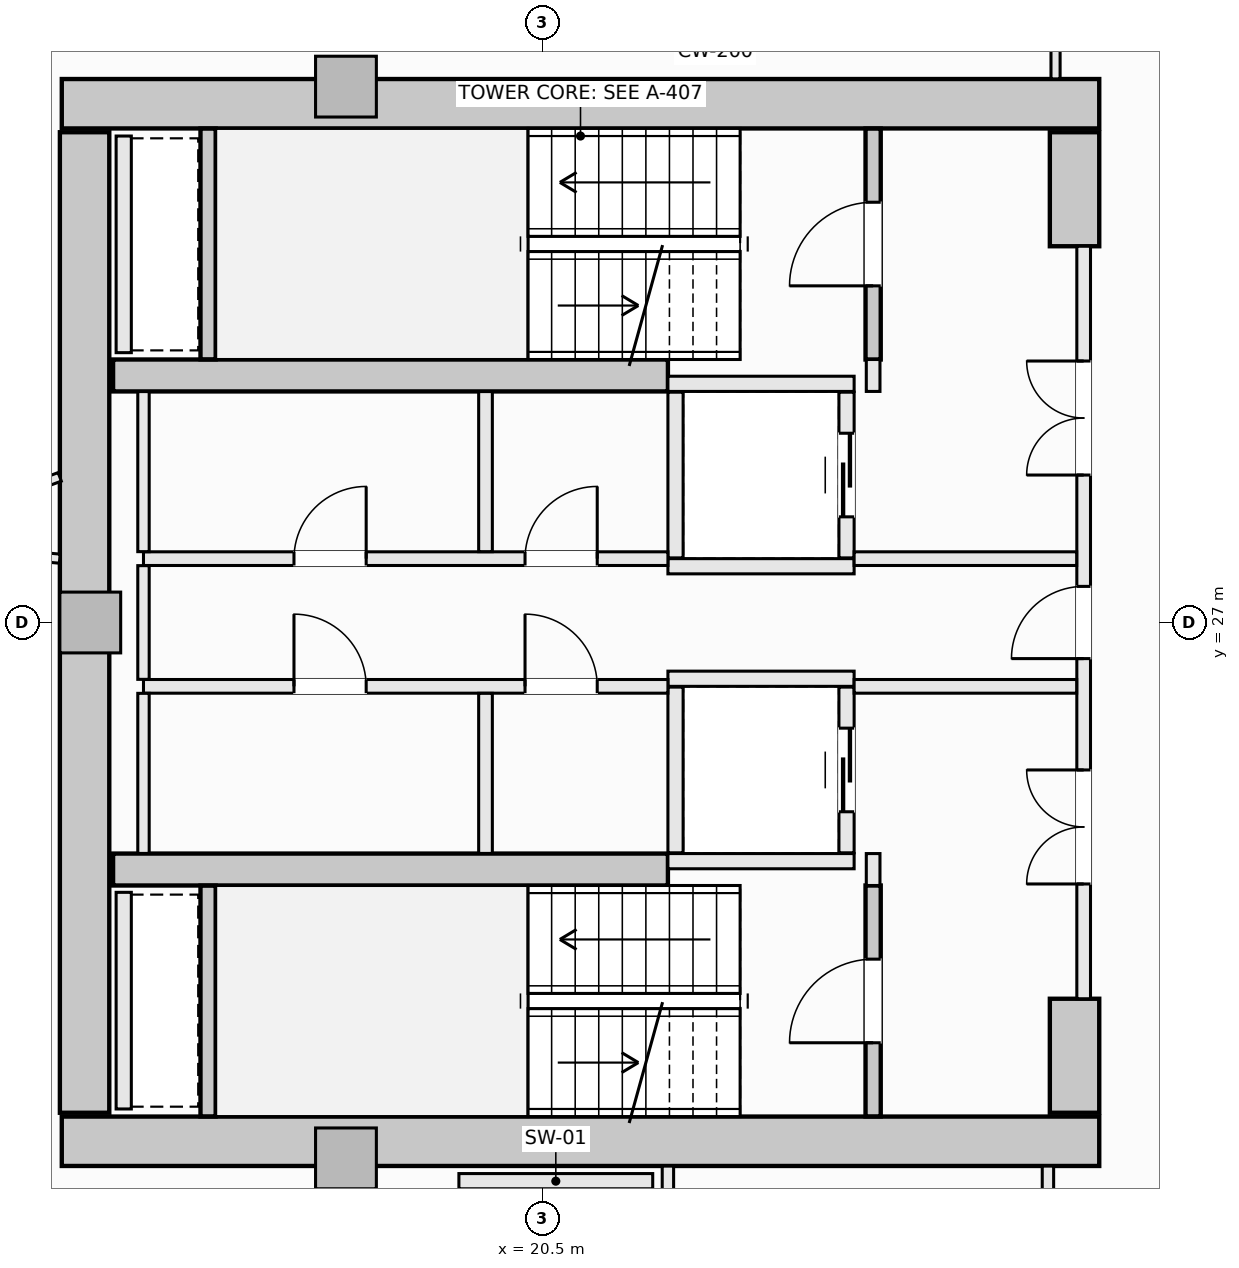
"""IFC4 building model, lengths in metres.
Left out: names, types, materials, properties, quantities, classifications, styles, units other than length and angle.
Written with IfcOpenShell. Run it as: python <this file> out.ifc"""

import sys

from ifc_helpers import new_model, si_unit, direction, frame, frame_2d, origin, origin_2d, place, context, subcontext, project, spatial, rectangle, extrude, element, fill, save


model = new_model("IFC4")
c1 = context("Model", 3, precision=1e-05, world=origin(), true_north=direction((0.0, 1.0)))
c2 = subcontext(c1, "Body", "Model", "MODEL_VIEW")
j1 = project(units=[si_unit("LENGTHUNIT", "METRE"), si_unit("PLANEANGLEUNIT", "RADIAN")], contexts=[c1])
p1 = place(None, origin())
s1 = spatial("IfcSite", under=j1, at=p1, CompositionType="ELEMENT")
p2 = place(p1, origin())
s2 = spatial("IfcBuilding", under=s1, at=p2, CompositionType="ELEMENT")
p3 = place(p2, frame((0.0, 0.0, 132.5)))
s3 = spatial("IfcBuildingStorey", under=s2, at=p3, CompositionType="ELEMENT", Elevation=132.5)
for number, where, z_axis, x_axis in (
    (1, (14.175, 33.825, -0.27), (0.0, 0.0, 1.0), (1.0, 0.0, 0.0)),
    (2, (14.175, 20.175, -0.27), (0.0, 0.0, 1.0), (1.0, 0.0, 0.0)),
):
    element("IfcWall", number, at=place(p3, frame(where, z_axis=z_axis, x_axis=x_axis)), inside=s3, PredefinedType="SHEAR", context=c2, shape_type="SweptSolid", body=[
        extrude(rectangle(XDim=13.65, YDim=0.65, at=frame_2d((6.825, 0.0))), origin(), (0.0, 0.0, 1.0), 3.4),
    ])
p4 = place(p3, frame((14.475, 20.55, -0.27), z_axis=(0.0, 0.0, 1.0), x_axis=(0.0, 1.0, 0.0)))
e3 = element("IfcWall", 3, at=p4, inside=s3, PredefinedType="SHEAR", context=c2, shape_type="SweptSolid", body=[
    extrude(rectangle(XDim=12.9, YDim=0.65, at=frame_2d((6.45, 0.0))), origin(), (0.0, 0.0, 1.0), 3.4),
])
for number, where, z_axis, x_axis in (
    (4, (27.5, 31.95, -0.27), (0.0, 0.0, 1.0), (0.0, 1.0, 0.0)),
    (5, (27.5, 20.55, -0.27), (0.0, 0.0, 1.0), (0.0, 1.0, 0.0)),
):
    element("IfcWall", number, at=place(p3, frame(where, z_axis=z_axis, x_axis=x_axis)), inside=s3, PredefinedType="SHEAR", context=c2, shape_type="SweptSolid", body=[
        extrude(rectangle(XDim=1.5, YDim=0.65, at=frame_2d((0.75, 0.0))), origin(), (0.0, 0.0, 1.0), 3.4),
    ])
for number, where, z_axis, x_axis in (
    (6, (14.85, 30.25, -0.27), (0.0, 0.0, 1.0), (1.0, 0.0, 0.0)),
    (7, (14.85, 23.75, -0.27), (0.0, 0.0, 1.0), (1.0, 0.0, 0.0)),
):
    element("IfcWall", number, at=place(p3, frame(where, z_axis=z_axis, x_axis=x_axis)), inside=s3, PredefinedType="SHEAR", context=c2, shape_type="SweptSolid", body=[
        extrude(rectangle(XDim=7.3, YDim=0.42, at=frame_2d((3.65, 0.0))), origin(), (0.0, 0.0, 1.0), 3.4),
    ])
for number, where, z_axis, x_axis in (
    (8, (17.914, 34.05, -0.27), (0.0, 0.0, 1.0), (1.0, 0.0, 0.0)),
    (9, (14.55, 27.0, -0.27), (0.0, 0.0, 1.0), (1.0, 0.0, 0.0)),
    (10, (17.914, 19.95, -0.27), (0.0, 0.0, 1.0), (1.0, 0.0, 0.0)),
):
    element("IfcColumn", number, at=place(p3, frame(where, z_axis=z_axis, x_axis=x_axis)), inside=s3, PredefinedType="PILASTER", context=c2, shape_type="SweptSolid", body=[
        extrude(rectangle(XDim=0.8, YDim=0.8, at=origin_2d()), origin(), (0.0, 0.0, 1.0), 3.4),
    ])
p5 = place(p3, frame((24.85, 30.46, -0.27), z_axis=(0.0, 0.0, 1.0), x_axis=(0.0, 1.0, 0.0)))
e11 = element("IfcWall", 11, at=p5, inside=s3, PredefinedType="SHEAR", context=c2, shape_type="SweptSolid", body=[
    extrude(rectangle(XDim=3.038, YDim=0.2, at=frame_2d((1.519, 0.0))), origin(), (0.0, 0.0, 1.0), 3.4),
])
p6 = place(p5, frame((0.969, 0.0, 0.27)))
e12 = element("IfcOpeningElement", 12, at=p6, cuts=e11, PredefinedType="OPENING", context=c2, shape_type="SweptSolid", body=[
    extrude(rectangle(XDim=1.1, YDim=2.15, at=frame_2d((0.55, 1.075))), frame((0.0, 0.11, 0.0), z_axis=(0.0, -1.0, 0.0), x_axis=(1.0, 0.0, 0.0)), (0.0, 0.0, 1.0), 0.22),
])
p7 = place(p3, frame((16.1, 30.462, -0.27), z_axis=(0.0, 0.0, 1.0), x_axis=(0.0, 1.0, 0.0)))
e13 = element("IfcWall", 13, at=p7, inside=s3, PredefinedType="SHEAR", context=c2, shape_type="SweptSolid", body=[
    extrude(rectangle(XDim=3.036, YDim=0.2, at=frame_2d((1.518, 0.0))), origin(), (0.0, 0.0, 1.0), 3.4),
])
p8 = place(p3, frame((24.85, 20.502, -0.27), z_axis=(0.0, 0.0, 1.0), x_axis=(0.0, 1.0, 0.0)))
e14 = element("IfcWall", 14, at=p8, inside=s3, PredefinedType="SHEAR", context=c2, shape_type="SweptSolid", body=[
    extrude(rectangle(XDim=3.038, YDim=0.2, at=frame_2d((1.519, 0.0))), origin(), (0.0, 0.0, 1.0), 3.4),
])
p9 = place(p8, frame((0.969, 0.0, 0.27)))
e15 = element("IfcOpeningElement", 15, at=p9, cuts=e14, PredefinedType="OPENING", context=c2, shape_type="SweptSolid", body=[
    extrude(rectangle(XDim=1.1, YDim=2.15, at=frame_2d((0.55, 1.075))), frame((0.0, 0.11, 0.0), z_axis=(0.0, -1.0, 0.0), x_axis=(1.0, 0.0, 0.0)), (0.0, 0.0, 1.0), 0.22),
])
p10 = place(p3, frame((16.1, 20.502, -0.27), z_axis=(0.0, 0.0, 1.0), x_axis=(0.0, 1.0, 0.0)))
e16 = element("IfcWall", 16, at=p10, inside=s3, PredefinedType="SHEAR", context=c2, shape_type="SweptSolid", body=[
    extrude(rectangle(XDim=3.036, YDim=0.2, at=frame_2d((1.518, 0.0))), origin(), (0.0, 0.0, 1.0), 3.4),
])
for number, where, z_axis, x_axis in (
    (17, (22.15, 30.14, 0.0), (0.0, 0.0, 1.0), (1.0, 0.0, 0.0)),
    (18, (22.15, 27.74, 0.0), (0.0, 0.0, 1.0), (1.0, 0.0, 0.0)),
):
    element("IfcWall", number, at=place(p3, frame(where, z_axis=z_axis, x_axis=x_axis)), inside=s3, PredefinedType="SOLIDWALL", context=c2, shape_type="SweptSolid", body=[
        extrude(rectangle(XDim=2.45, YDim=0.2, at=frame_2d((1.225, 0.0))), origin(), (0.0, 0.0, 1.0), 3.13),
    ])
p11 = place(p3, frame((22.25, 27.85, 0.0), z_axis=(0.0, 0.0, 1.0), x_axis=(0.0, 1.0, 0.0)))
e19 = element("IfcWall", 19, at=p11, inside=s3, PredefinedType="SOLIDWALL", context=c2, shape_type="SweptSolid", body=[
    extrude(rectangle(XDim=2.18, YDim=0.2, at=frame_2d((1.09, 0.0))), origin(), (0.0, 0.0, 1.0), 3.13),
])
p12 = place(p3, frame((24.5, 27.85, 0.0), z_axis=(0.0, 0.0, 1.0), x_axis=(0.0, 1.0, 0.0)))
e20 = element("IfcWall", 20, at=p12, inside=s3, PredefinedType="SOLIDWALL", context=c2, shape_type="SweptSolid", body=[
    extrude(rectangle(XDim=2.18, YDim=0.2, at=frame_2d((1.09, 0.0))), origin(), (0.0, 0.0, 1.0), 3.13),
])
p13 = place(p12, frame((0.54, 0.0, 0.0)))
e21 = element("IfcOpeningElement", 21, at=p13, cuts=e20, PredefinedType="OPENING", context=c2, shape_type="SweptSolid", body=[
    extrude(rectangle(XDim=1.1, YDim=2.2, at=frame_2d((0.55, 1.1))), frame((0.0, 0.11, 0.0), z_axis=(0.0, -1.0, 0.0), x_axis=(1.0, 0.0, 0.0)), (0.0, 0.0, 1.0), 0.22),
])
for number, where, z_axis, x_axis in (
    (22, (22.15, 26.26, 0.0), (0.0, 0.0, 1.0), (1.0, 0.0, 0.0)),
    (23, (22.15, 23.86, 0.0), (0.0, 0.0, 1.0), (1.0, 0.0, 0.0)),
):
    element("IfcWall", number, at=place(p3, frame(where, z_axis=z_axis, x_axis=x_axis)), inside=s3, PredefinedType="SOLIDWALL", context=c2, shape_type="SweptSolid", body=[
        extrude(rectangle(XDim=2.45, YDim=0.2, at=frame_2d((1.225, 0.0))), origin(), (0.0, 0.0, 1.0), 3.13),
    ])
p14 = place(p3, frame((22.25, 23.97, 0.0), z_axis=(0.0, 0.0, 1.0), x_axis=(0.0, 1.0, 0.0)))
e24 = element("IfcWall", 24, at=p14, inside=s3, PredefinedType="SOLIDWALL", context=c2, shape_type="SweptSolid", body=[
    extrude(rectangle(XDim=2.18, YDim=0.2, at=frame_2d((1.09, 0.0))), origin(), (0.0, 0.0, 1.0), 3.13),
])
p15 = place(p3, frame((24.5, 23.97, 0.0), z_axis=(0.0, 0.0, 1.0), x_axis=(0.0, 1.0, 0.0)))
e25 = element("IfcWall", 25, at=p15, inside=s3, PredefinedType="SOLIDWALL", context=c2, shape_type="SweptSolid", body=[
    extrude(rectangle(XDim=2.18, YDim=0.2, at=frame_2d((1.09, 0.0))), origin(), (0.0, 0.0, 1.0), 3.13),
])
p16 = place(p15, frame((0.54, 0.0, 0.0)))
e26 = element("IfcOpeningElement", 26, at=p16, cuts=e25, PredefinedType="OPENING", context=c2, shape_type="SweptSolid", body=[
    extrude(rectangle(XDim=1.1, YDim=2.2, at=frame_2d((0.55, 1.1))), frame((0.0, 0.11, 0.0), z_axis=(0.0, -1.0, 0.0), x_axis=(1.0, 0.0, 0.0)), (0.0, 0.0, 1.0), 0.22),
])
p17 = place(p3, frame((19.4, 19.65, 0.0), z_axis=(0.0, 0.0, 1.0), x_axis=(1.0, 0.0, 0.0)))
e27 = element("IfcWall", 27, at=p17, inside=s3, PredefinedType="SOLIDWALL", context=c2, shape_type="SweptSolid", body=[
    extrude(rectangle(XDim=2.55, YDim=0.2, at=frame_2d((1.275, 0.0))), origin(), (0.0, 0.0, 1.0), 3.13),
])
for number, where, z_axis, x_axis in (
    (28, (14.99, 30.55, 0.0), (0.0, 0.0, 1.0), (0.0, 1.0, 0.0)),
    (29, (14.99, 20.6, 0.0), (0.0, 0.0, 1.0), (0.0, 1.0, 0.0)),
):
    element("IfcWall", number, at=place(p3, frame(where, z_axis=z_axis, x_axis=x_axis)), inside=s3, PredefinedType="SOLIDWALL", context=c2, shape_type="SweptSolid", body=[
        extrude(rectangle(XDim=2.85, YDim=0.2, at=frame_2d((1.425, 0.0))), origin(), (0.0, 0.0, 1.0), 3.13),
    ])
for number, where, z_axis, x_axis in (
    (30, (24.85, 23.54, 0.0), (0.0, 0.0, 1.0), (0.0, 1.0, 0.0)),
    (31, (24.85, 30.04, 0.0), (0.0, 0.0, 1.0), (0.0, 1.0, 0.0)),
):
    element("IfcWall", number, at=place(p3, frame(where, z_axis=z_axis, x_axis=x_axis)), inside=s3, PredefinedType="SOLIDWALL", context=c2, shape_type="SweptSolid", body=[
        extrude(rectangle(XDim=0.42, YDim=0.18, at=frame_2d((0.21, 0.0))), origin(), (0.0, 0.0, 1.0), 3.13),
    ])
p18 = place(p3, frame((27.62, 22.05, 0.0), z_axis=(0.0, 0.0, 1.0), x_axis=(0.0, 1.0, 0.0)))
e32 = element("IfcWall", 32, at=p18, inside=s3, PredefinedType="SOLIDWALL", context=c2, shape_type="SweptSolid", body=[
    extrude(rectangle(XDim=9.9, YDim=0.18, at=frame_2d((4.95, 0.0))), origin(), (0.0, 0.0, 1.0), 3.13),
])
p19 = place(p18, frame((4.475, 0.0, 0.0)))
e33 = element("IfcOpeningElement", 33, at=p19, cuts=e32, PredefinedType="OPENING", context=c2, shape_type="SweptSolid", body=[
    extrude(rectangle(XDim=0.95, YDim=2.1, at=frame_2d((0.475, 1.05))), frame((0.0, 0.1, 0.0), z_axis=(0.0, -1.0, 0.0), x_axis=(1.0, 0.0, 0.0)), (0.0, 0.0, 1.0), 0.2),
])
p20 = place(p18, frame((6.89, 0.0, 0.0)))
e34 = element("IfcOpeningElement", 34, at=p20, cuts=e32, PredefinedType="OPENING", context=c2, shape_type="SweptSolid", body=[
    extrude(rectangle(XDim=1.5, YDim=2.2, at=frame_2d((0.75, 1.1))), frame((0.0, 0.1, 0.0), z_axis=(0.0, -1.0, 0.0), x_axis=(1.0, 0.0, 0.0)), (0.0, 0.0, 1.0), 0.2),
])
p21 = place(p18, frame((1.51, 0.0, 0.0)))
e35 = element("IfcOpeningElement", 35, at=p21, cuts=e32, PredefinedType="OPENING", context=c2, shape_type="SweptSolid", body=[
    extrude(rectangle(XDim=1.5, YDim=2.2, at=frame_2d((0.75, 1.1))), frame((0.0, 0.1, 0.0), z_axis=(0.0, -1.0, 0.0), x_axis=(1.0, 0.0, 0.0)), (0.0, 0.0, 1.0), 0.2),
])
p22 = place(p3, frame((15.25, 27.84, 0.0), z_axis=(0.0, 0.0, 1.0), x_axis=(1.0, 0.0, 0.0)))
e36 = element("IfcWall", 36, at=p22, inside=s3, PredefinedType="SOLIDWALL", context=c2, shape_type="SweptSolid", body=[
    extrude(rectangle(XDim=6.9, YDim=0.18, at=frame_2d((3.45, 0.0))), origin(), (0.0, 0.0, 1.0), 3.13),
])
p23 = place(p22, frame((5.02, 0.0, 0.0)))
e37 = element("IfcOpeningElement", 37, at=p23, cuts=e36, PredefinedType="OPENING", context=c2, shape_type="SweptSolid", body=[
    extrude(rectangle(XDim=0.95, YDim=2.1, at=frame_2d((0.475, 1.05))), frame((0.0, 0.1, 0.0), z_axis=(0.0, -1.0, 0.0), x_axis=(1.0, 0.0, 0.0)), (0.0, 0.0, 1.0), 0.2),
])
p24 = place(p22, frame((1.98, 0.0, 0.0)))
e38 = element("IfcOpeningElement", 38, at=p24, cuts=e36, PredefinedType="OPENING", context=c2, shape_type="SweptSolid", body=[
    extrude(rectangle(XDim=0.95, YDim=2.1, at=frame_2d((0.475, 1.05))), frame((0.0, 0.1, 0.0), z_axis=(0.0, -1.0, 0.0), x_axis=(1.0, 0.0, 0.0)), (0.0, 0.0, 1.0), 0.2),
])
p25 = place(p3, frame((24.6, 27.84, 0.0), z_axis=(0.0, 0.0, 1.0), x_axis=(1.0, 0.0, 0.0)))
e39 = element("IfcWall", 39, at=p25, inside=s3, PredefinedType="SOLIDWALL", context=c2, shape_type="SweptSolid", body=[
    extrude(rectangle(XDim=2.928, YDim=0.18, at=frame_2d((1.464, 0.0))), origin(), (0.0, 0.0, 1.0), 3.13),
])
p26 = place(p3, frame((15.25, 26.16, 0.0), z_axis=(0.0, 0.0, 1.0), x_axis=(1.0, 0.0, 0.0)))
e40 = element("IfcWall", 40, at=p26, inside=s3, PredefinedType="SOLIDWALL", context=c2, shape_type="SweptSolid", body=[
    extrude(rectangle(XDim=6.9, YDim=0.18, at=frame_2d((3.45, 0.0))), origin(), (0.0, 0.0, 1.0), 3.13),
])
p27 = place(p26, frame((5.02, 0.0, 0.0)))
e41 = element("IfcOpeningElement", 41, at=p27, cuts=e40, PredefinedType="OPENING", context=c2, shape_type="SweptSolid", body=[
    extrude(rectangle(XDim=0.95, YDim=2.1, at=frame_2d((0.475, 1.05))), frame((0.0, 0.1, 0.0), z_axis=(0.0, -1.0, 0.0), x_axis=(1.0, 0.0, 0.0)), (0.0, 0.0, 1.0), 0.2),
])
p28 = place(p26, frame((1.98, 0.0, 0.0)))
e42 = element("IfcOpeningElement", 42, at=p28, cuts=e40, PredefinedType="OPENING", context=c2, shape_type="SweptSolid", body=[
    extrude(rectangle(XDim=0.95, YDim=2.1, at=frame_2d((0.475, 1.05))), frame((0.0, 0.1, 0.0), z_axis=(0.0, -1.0, 0.0), x_axis=(1.0, 0.0, 0.0)), (0.0, 0.0, 1.0), 0.2),
])
p29 = place(p3, frame((24.6, 26.16, 0.0), z_axis=(0.0, 0.0, 1.0), x_axis=(1.0, 0.0, 0.0)))
e43 = element("IfcWall", 43, at=p29, inside=s3, PredefinedType="SOLIDWALL", context=c2, shape_type="SweptSolid", body=[
    extrude(rectangle(XDim=2.928, YDim=0.18, at=frame_2d((1.464, 0.0))), origin(), (0.0, 0.0, 1.0), 3.13),
])
p30 = place(p3, frame((15.25, 23.962, 0.0), z_axis=(0.0, 0.0, 1.0), x_axis=(0.0, 1.0, 0.0)))
e44 = element("IfcWall", 44, at=p30, inside=s3, PredefinedType="PARTITIONING", context=c2, shape_type="SweptSolid", body=[
    extrude(rectangle(XDim=2.106, YDim=0.15, at=frame_2d((1.053, 0.0))), origin(), (0.0, 0.0, 1.0), 3.13),
])
p31 = place(p3, frame((15.25, 26.252, 0.0), z_axis=(0.0, 0.0, 1.0), x_axis=(0.0, 1.0, 0.0)))
e45 = element("IfcWall", 45, at=p31, inside=s3, PredefinedType="PARTITIONING", context=c2, shape_type="SweptSolid", body=[
    extrude(rectangle(XDim=1.496, YDim=0.15, at=frame_2d((0.748, 0.0))), origin(), (0.0, 0.0, 1.0), 3.13),
])
p32 = place(p3, frame((15.25, 27.932, 0.0), z_axis=(0.0, 0.0, 1.0), x_axis=(0.0, 1.0, 0.0)))
e46 = element("IfcWall", 46, at=p32, inside=s3, PredefinedType="PARTITIONING", context=c2, shape_type="SweptSolid", body=[
    extrude(rectangle(XDim=2.106, YDim=0.15, at=frame_2d((1.053, 0.0))), origin(), (0.0, 0.0, 1.0), 3.13),
])
for number, where, z_axis, x_axis in (
    (47, (19.75, 23.962, 0.0), (0.0, 0.0, 1.0), (0.0, 1.0, 0.0)),
    (48, (19.75, 27.932, 0.0), (0.0, 0.0, 1.0), (0.0, 1.0, 0.0)),
):
    element("IfcWall", number, at=place(p3, frame(where, z_axis=z_axis, x_axis=x_axis)), inside=s3, PredefinedType="SOLIDWALL", context=c2, shape_type="SweptSolid", body=[
        extrude(rectangle(XDim=2.106, YDim=0.18, at=frame_2d((1.053, 0.0))), origin(), (0.0, 0.0, 1.0), 3.13),
    ])
p33 = place(p3, frame((22.15, 17.127, 0.0), z_axis=(0.0, 0.0, 1.0), x_axis=(0.0, 1.0, 0.0)))
e49 = element("IfcWall", 49, at=p33, inside=s3, PredefinedType="PARTITIONING", context=c2, shape_type="SweptSolid", body=[
    extrude(rectangle(XDim=2.721, YDim=0.15, at=frame_2d((1.36, 0.0))), origin(), (0.0, 0.0, 1.0), 3.13),
])
p34 = place(p3, frame((27.15, 17.127, 0.0), z_axis=(0.0, 0.0, 1.0), x_axis=(0.0, 1.0, 0.0)))
e50 = element("IfcWall", 50, at=p34, inside=s3, PredefinedType="PARTITIONING", context=c2, shape_type="SweptSolid", body=[
    extrude(rectangle(XDim=2.721, YDim=0.15, at=frame_2d((1.36, 0.0))), origin(), (0.0, 0.0, 1.0), 3.13),
])
p35 = place(p34, frame((0.885, 0.0, 0.0)))
e51 = element("IfcOpeningElement", 51, at=p35, cuts=e50, PredefinedType="OPENING", context=c2, shape_type="SweptSolid", body=[
    extrude(rectangle(XDim=0.95, YDim=2.1, at=frame_2d((0.475, 1.05))), frame((0.0, 0.085, 0.0), z_axis=(0.0, -1.0, 0.0), x_axis=(1.0, 0.0, 0.0)), (0.0, 0.0, 1.0), 0.17),
])
p36 = place(p3, frame((27.25, 34.152, 0.0), z_axis=(0.0, 0.0, 1.0), x_axis=(0.0, 1.0, 0.0)))
e52 = element("IfcWall", 52, at=p36, inside=s3, PredefinedType="PARTITIONING", context=c2, shape_type="SweptSolid", body=[
    extrude(rectangle(XDim=0.806, YDim=0.12, at=frame_2d((0.403, 0.0))), origin(), (0.0, 0.0, 1.0), 3.13),
])
p37 = place(p3, frame((6.343, 28.53, 0.0), z_axis=(0.0, 0.0, 1.0), x_axis=(0.996118126143, -0.088026579903, 0.0)))
e53 = element("IfcWall", 53, at=p37, inside=s3, PredefinedType="PARTITIONING", context=c2, shape_type="SweptSolid", body=[
    extrude(rectangle(XDim=7.835, YDim=0.12, at=frame_2d((3.917, 0.0))), origin(), (0.0, 0.0, 1.0), 3.13),
])
p38 = place(p3, frame((11.943, 28.097, 0.0), z_axis=(0.0, 0.0, 1.0), x_axis=(0.937403974444, 0.348243863831, 0.0)))
e54 = element("IfcWall", 54, at=p38, inside=s3, PredefinedType="PARTITIONING", context=c2, shape_type="SweptSolid", body=[
    extrude(rectangle(XDim=2.352, YDim=0.12, at=frame_2d((1.176, 0.0))), origin(), (0.0, 0.0, 1.0), 3.13),
])
p39 = place(p6, origin())
e55 = element("IfcDoor", 55, at=p39, inside=s3, OperationType="SINGLE_SWING_LEFT", PredefinedType="DOOR", context=c2, shape_type="SweptSolid", body=[
    extrude(rectangle(XDim=1.1, YDim=2.15, at=frame_2d((0.55, 1.075))), frame((0.0, 0.025, 0.0), z_axis=(0.0, -1.0, 0.0), x_axis=(1.0, 0.0, 0.0)), (0.0, 0.0, 1.0), 0.05),
])
fill(e12, e55)
p40 = place(p9, origin())
e56 = element("IfcDoor", 56, at=p40, inside=s3, OperationType="SINGLE_SWING_LEFT", PredefinedType="DOOR", context=c2, shape_type="SweptSolid", body=[
    extrude(rectangle(XDim=1.1, YDim=2.15, at=frame_2d((0.55, 1.075))), frame((0.0, 0.025, 0.0), z_axis=(0.0, -1.0, 0.0), x_axis=(1.0, 0.0, 0.0)), (0.0, 0.0, 1.0), 0.05),
])
fill(e15, e56)
p41 = place(p13, origin())
e57 = element("IfcDoor", 57, at=p41, inside=s3, OperationType="SLIDING_TO_LEFT", PredefinedType="DOOR", context=c2, shape_type="SweptSolid", body=[
    extrude(rectangle(XDim=1.1, YDim=2.2, at=frame_2d((0.55, 1.1))), frame((0.0, 0.025, 0.0), z_axis=(0.0, -1.0, 0.0), x_axis=(1.0, 0.0, 0.0)), (0.0, 0.0, 1.0), 0.05),
])
fill(e21, e57)
p42 = place(p16, origin())
e58 = element("IfcDoor", 58, at=p42, inside=s3, OperationType="SLIDING_TO_LEFT", PredefinedType="DOOR", context=c2, shape_type="SweptSolid", body=[
    extrude(rectangle(XDim=1.1, YDim=2.2, at=frame_2d((0.55, 1.1))), frame((0.0, 0.025, 0.0), z_axis=(0.0, -1.0, 0.0), x_axis=(1.0, 0.0, 0.0)), (0.0, 0.0, 1.0), 0.05),
])
fill(e26, e58)
p43 = place(p19, origin())
e59 = element("IfcDoor", 59, at=p43, inside=s3, OperationType="SINGLE_SWING_LEFT", PredefinedType="DOOR", context=c2, shape_type="SweptSolid", body=[
    extrude(rectangle(XDim=0.95, YDim=2.1, at=frame_2d((0.475, 1.05))), frame((0.0, 0.025, 0.0), z_axis=(0.0, -1.0, 0.0), x_axis=(1.0, 0.0, 0.0)), (0.0, 0.0, 1.0), 0.05),
])
fill(e33, e59)
p44 = place(p20, origin())
e60 = element("IfcDoor", 60, at=p44, inside=s3, OperationType="DOUBLE_DOOR_SINGLE_SWING", PredefinedType="DOOR", context=c2, shape_type="SweptSolid", body=[
    extrude(rectangle(XDim=1.5, YDim=2.2, at=frame_2d((0.75, 1.1))), frame((0.0, 0.025, 0.0), z_axis=(0.0, -1.0, 0.0), x_axis=(1.0, 0.0, 0.0)), (0.0, 0.0, 1.0), 0.05),
])
fill(e34, e60)
p45 = place(p21, origin())
e61 = element("IfcDoor", 61, at=p45, inside=s3, OperationType="DOUBLE_DOOR_SINGLE_SWING", PredefinedType="DOOR", context=c2, shape_type="SweptSolid", body=[
    extrude(rectangle(XDim=1.5, YDim=2.2, at=frame_2d((0.75, 1.1))), frame((0.0, 0.025, 0.0), z_axis=(0.0, -1.0, 0.0), x_axis=(1.0, 0.0, 0.0)), (0.0, 0.0, 1.0), 0.05),
])
fill(e35, e61)
p46 = place(p23, origin())
e62 = element("IfcDoor", 62, at=p46, inside=s3, OperationType="SINGLE_SWING_RIGHT", PredefinedType="DOOR", context=c2, shape_type="SweptSolid", body=[
    extrude(rectangle(XDim=0.95, YDim=2.1, at=frame_2d((0.475, 1.05))), frame((0.0, 0.025, 0.0), z_axis=(0.0, -1.0, 0.0), x_axis=(1.0, 0.0, 0.0)), (0.0, 0.0, 1.0), 0.05),
])
fill(e37, e62)
p47 = place(p27, origin())
e63 = element("IfcDoor", 63, at=p47, inside=s3, OperationType="SINGLE_SWING_LEFT", PredefinedType="DOOR", context=c2, shape_type="SweptSolid", body=[
    extrude(rectangle(XDim=0.95, YDim=2.1, at=frame_2d((0.475, 1.05))), frame((0.0, 0.025, 0.0), z_axis=(0.0, -1.0, 0.0), x_axis=(1.0, 0.0, 0.0)), (0.0, 0.0, 1.0), 0.05),
])
fill(e41, e63)
p48 = place(p24, origin())
e64 = element("IfcDoor", 64, at=p48, inside=s3, OperationType="SINGLE_SWING_RIGHT", PredefinedType="DOOR", context=c2, shape_type="SweptSolid", body=[
    extrude(rectangle(XDim=0.95, YDim=2.1, at=frame_2d((0.475, 1.05))), frame((0.0, 0.025, 0.0), z_axis=(0.0, -1.0, 0.0), x_axis=(1.0, 0.0, 0.0)), (0.0, 0.0, 1.0), 0.05),
])
fill(e38, e64)
p49 = place(p28, origin())
e65 = element("IfcDoor", 65, at=p49, inside=s3, OperationType="SINGLE_SWING_LEFT", PredefinedType="DOOR", context=c2, shape_type="SweptSolid", body=[
    extrude(rectangle(XDim=0.95, YDim=2.1, at=frame_2d((0.475, 1.05))), frame((0.0, 0.025, 0.0), z_axis=(0.0, -1.0, 0.0), x_axis=(1.0, 0.0, 0.0)), (0.0, 0.0, 1.0), 0.05),
])
fill(e42, e65)
save(model, sys.argv[1])
